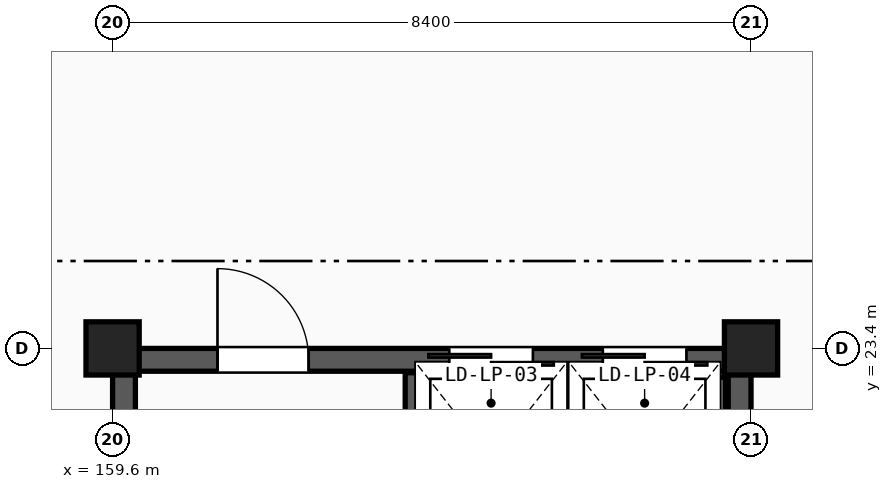
"""IFC4 building model, lengths in metres.
Left out: names, types, materials, properties, quantities, classifications, styles, units other than length and angle.
Written with IfcOpenShell. Run it as: python <this file> out.ifc"""

import sys

from ifc_helpers import new_model, si_unit, direction, frame, frame_2d, origin, origin_2d, place, context, subcontext, project, spatial, rectangle, extrude, element, fill, save


model = new_model("IFC4")
c1 = context("Model", 3, precision=1e-05, world=origin(), true_north=direction((0.0, 1.0)))
c2 = subcontext(c1, "Body", "Model", "MODEL_VIEW")
j1 = project(units=[si_unit("LENGTHUNIT", "METRE"), si_unit("PLANEANGLEUNIT", "RADIAN")], contexts=[c1])
p1 = place(None, origin())
s1 = spatial("IfcSite", under=j1, at=p1, CompositionType="ELEMENT")
p2 = place(p1, origin())
s2 = spatial("IfcBuilding", under=s1, at=p2, CompositionType="ELEMENT")
p3 = place(p2, frame((0.0, 0.0, -5.1)))
s3 = spatial("IfcBuildingStorey", under=s2, at=p3, CompositionType="ELEMENT", Elevation=-5.1)
for number, where, z_axis, x_axis in (
    (1, (159.6, 23.4, -0.22), (0.0, 0.0, 1.0), (1.0, 0.0, 0.0)),
    (2, (168.0, 23.4, -0.22), (0.0, 0.0, 1.0), (1.0, 0.0, 0.0)),
):
    element("IfcColumn", number, at=place(p3, frame(where, z_axis=z_axis, x_axis=x_axis)), inside=s3, PredefinedType="COLUMN", context=c2, shape_type="SweptSolid", body=[
        extrude(rectangle(XDim=0.7, YDim=0.7, at=origin_2d()), origin(), (0.0, 0.0, 1.0), 5.32),
    ])
p4 = place(p3, frame((159.6, 23.25, -0.22), z_axis=(0.0, 0.0, 1.0), x_axis=(1.0, 0.0, 0.0)))
e3 = element("IfcWall", 3, at=p4, inside=s3, PredefinedType="SHEAR", context=c2, shape_type="SweptSolid", body=[
    extrude(rectangle(XDim=8.4, YDim=0.3, at=frame_2d((4.2, 0.0))), origin(), (0.0, 0.0, 1.0), 5.09),
])
p5 = place(p4, frame((1.38, 0.0, 0.22)))
e4 = element("IfcOpeningElement", 4, at=p5, cuts=e3, PredefinedType="OPENING", context=c2, shape_type="SweptSolid", body=[
    extrude(rectangle(XDim=1.2, YDim=2.15, at=frame_2d((0.6, 1.075))), frame((0.0, 0.16, 0.0), z_axis=(0.0, -1.0, 0.0), x_axis=(1.0, 0.0, 0.0)), (0.0, 0.0, 1.0), 0.32),
])
p6 = place(p4, frame((4.43, 0.0, 0.22)))
e5 = element("IfcOpeningElement", 5, at=p6, cuts=e3, PredefinedType="OPENING", context=c2, shape_type="SweptSolid", body=[
    extrude(rectangle(XDim=1.1, YDim=2.15, at=frame_2d((0.55, 1.075))), frame((0.0, 0.16, 0.0), z_axis=(0.0, -1.0, 0.0), x_axis=(1.0, 0.0, 0.0)), (0.0, 0.0, 1.0), 0.32),
])
p7 = place(p4, frame((6.45, 0.0, 0.22)))
e6 = element("IfcOpeningElement", 6, at=p7, cuts=e3, PredefinedType="OPENING", context=c2, shape_type="SweptSolid", body=[
    extrude(rectangle(XDim=1.1, YDim=2.15, at=frame_2d((0.55, 1.075))), frame((0.0, 0.16, 0.0), z_axis=(0.0, -1.0, 0.0), x_axis=(1.0, 0.0, 0.0)), (0.0, 0.0, 1.0), 0.32),
])
for number, where, z_axis, x_axis in (
    (7, (159.75, 15.9, -0.22), (0.0, 0.0, 1.0), (0.0, 1.0, 0.0)),
    (8, (167.85, 15.9, -0.22), (0.0, 0.0, 1.0), (0.0, 1.0, 0.0)),
):
    element("IfcWall", number, at=place(p3, frame(where, z_axis=z_axis, x_axis=x_axis)), inside=s3, PredefinedType="SHEAR", context=c2, shape_type="SweptSolid", body=[
        extrude(rectangle(XDim=7.2, YDim=0.3, at=frame_2d((3.6, 0.0))), origin(), (0.0, 0.0, 1.0), 5.09),
    ])
p8 = place(p3, frame((163.55, 15.92, -0.22), z_axis=(0.0, 0.0, 1.0), x_axis=(0.0, 1.0, 0.0)))
e9 = element("IfcWall", 9, at=p8, inside=s3, PredefinedType="SHEAR", context=c2, shape_type="SweptSolid", body=[
    extrude(rectangle(XDim=7.16, YDim=0.2, at=frame_2d((3.58, 0.0))), origin(), (0.0, 0.0, 1.0), 5.09),
])
for number, where, z_axis, x_axis in (
    (10, (165.54, 20.88, 0.0), (0.0, 0.0, 1.0), (0.0, 1.0, 0.0)),
    (11, (167.56, 20.88, 0.0), (0.0, 0.0, 1.0), (0.0, 1.0, 0.0)),
):
    element("IfcWall", number, at=place(p3, frame(where, z_axis=z_axis, x_axis=x_axis)), inside=s3, PredefinedType="PARTITIONING", context=c2, shape_type="SweptSolid", body=[
        extrude(rectangle(XDim=2.14, YDim=0.2, at=frame_2d((1.07, 0.0))), origin(), (0.0, 0.0, 1.0), 4.25),
    ])
p9 = place(p5, origin())
e12 = element("IfcDoor", 12, at=p9, inside=s3, OperationType="SINGLE_SWING_LEFT", PredefinedType="DOOR", context=c2, shape_type="SweptSolid", body=[
    extrude(rectangle(XDim=1.2, YDim=2.15, at=frame_2d((0.6, 1.075))), frame((0.0, 0.025, 0.0), z_axis=(0.0, -1.0, 0.0), x_axis=(1.0, 0.0, 0.0)), (0.0, 0.0, 1.0), 0.05),
])
fill(e4, e12)
p10 = place(p6, origin())
e13 = element("IfcDoor", 13, at=p10, inside=s3, OperationType="DOUBLE_DOOR_SLIDING", PredefinedType="DOOR", context=c2, shape_type="SweptSolid", body=[
    extrude(rectangle(XDim=1.1, YDim=2.15, at=frame_2d((0.55, 1.075))), frame((0.0, 0.025, 0.0), z_axis=(0.0, -1.0, 0.0), x_axis=(1.0, 0.0, 0.0)), (0.0, 0.0, 1.0), 0.05),
])
fill(e5, e13)
p11 = place(p7, origin())
e14 = element("IfcDoor", 14, at=p11, inside=s3, OperationType="DOUBLE_DOOR_SLIDING", PredefinedType="DOOR", context=c2, shape_type="SweptSolid", body=[
    extrude(rectangle(XDim=1.1, YDim=2.15, at=frame_2d((0.55, 1.075))), frame((0.0, 0.025, 0.0), z_axis=(0.0, -1.0, 0.0), x_axis=(1.0, 0.0, 0.0)), (0.0, 0.0, 1.0), 0.05),
])
fill(e6, e14)
save(model, sys.argv[1])
